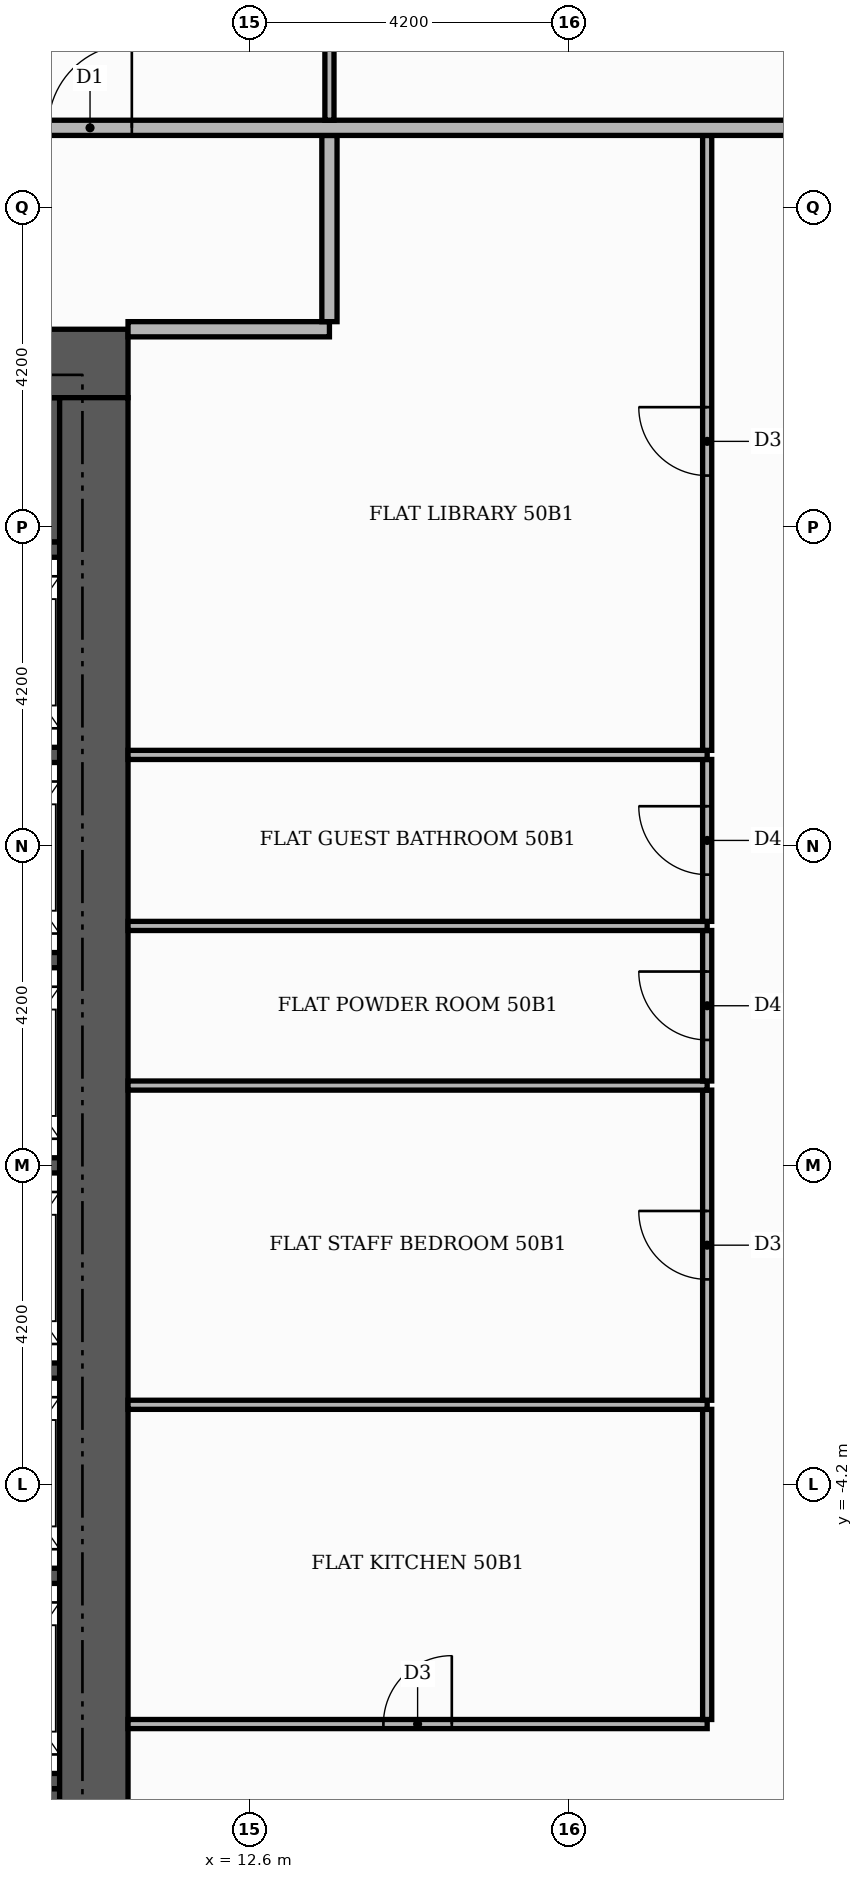
"""IFC4 building model, lengths in metres.
Left out: names, types, materials, properties, quantities, classifications, styles, units other than length and angle.
Written with IfcOpenShell. Run it as: python <this file> out.ifc"""

import sys

from ifc_helpers import new_model, si_unit, direction, frame, frame_2d, origin, place, context, subcontext, project, spatial, rectangle, extrude, element, fill, save


model = new_model("IFC4")
c1 = context("Model", 3, precision=1e-05, world=origin(), true_north=direction((0.0, 1.0)))
c2 = subcontext(c1, "Body", "Model", "MODEL_VIEW")
j1 = project(units=[si_unit("LENGTHUNIT", "METRE"), si_unit("PLANEANGLEUNIT", "RADIAN")], contexts=[c1])
p1 = place(None, origin())
s1 = spatial("IfcSite", under=j1, at=p1, CompositionType="ELEMENT")
p2 = place(p1, origin())
s2 = spatial("IfcBuilding", under=s1, at=p2, CompositionType="ELEMENT")
p3 = place(p2, frame((0.0, 0.0, 211.8)))
s3 = spatial("IfcBuildingStorey", under=s2, at=p3, CompositionType="ELEMENT", Elevation=211.8)
for number, where, z_axis, x_axis in (
    (1, (5.5, -9.15, 0.0), (0.0, 0.0, 1.0), (1.0, 0.0, 0.0)),
    (2, (5.5, 9.15, 0.0), (0.0, 0.0, 1.0), (1.0, 0.0, 0.0)),
):
    element("IfcWall", number, at=place(p3, frame(where, z_axis=z_axis, x_axis=x_axis)), inside=s3, PredefinedType="SHEAR", context=c2, shape_type="SweptSolid", body=[
        extrude(rectangle(XDim=4.6, YDim=1.9, at=frame_2d((2.3, 0.0))), origin(), (0.0, 0.0, 1.0), 3.48),
    ])
for number, where, z_axis, x_axis in (
    (3, (8.1, -8.1, 0.0), (0.0, 0.0, 1.0), (1.0, 0.0, 0.0)),
    (4, (8.1, -5.4, 0.0), (0.0, 0.0, 1.0), (1.0, 0.0, 0.0)),
    (5, (8.1, -2.7, 0.0), (0.0, 0.0, 1.0), (1.0, 0.0, 0.0)),
    (6, (8.1, 0.0, 0.0), (0.0, 0.0, 1.0), (1.0, 0.0, 0.0)),
    (7, (8.1, 2.7, 0.0), (0.0, 0.0, 1.0), (1.0, 0.0, 0.0)),
    (8, (8.1, 5.4, 0.0), (0.0, 0.0, 1.0), (1.0, 0.0, 0.0)),
    (9, (8.1, 8.1, 0.0), (0.0, 0.0, 1.0), (1.0, 0.0, 0.0)),
):
    element("IfcWall", number, at=place(p3, frame(where, z_axis=z_axis, x_axis=x_axis)), inside=s3, PredefinedType="SHEAR", context=c2, shape_type="SweptSolid", body=[
        extrude(rectangle(XDim=2.0, YDim=0.2, at=frame_2d((1.0, 0.0))), origin(), (0.0, 0.0, 1.0), 3.48),
    ])
p4 = place(p3, frame((-11.0, 10.55, 0.0), z_axis=(0.0, 0.0, 1.0), x_axis=(1.0, 0.0, 0.0)))
e10 = element("IfcWall", 10, at=p4, inside=s3, PredefinedType="SHEAR", context=c2, shape_type="SweptSolid", body=[
    extrude(rectangle(XDim=22.0, YDim=0.9, at=frame_2d((11.0, 0.0))), origin(), (0.0, 0.0, 1.0), 3.48),
])
p5 = place(p4, frame((13.3, 0.0, 0.0)))
e11 = element("IfcOpeningElement", 11, at=p5, cuts=e10, PredefinedType="OPENING", context=c2, shape_type="SweptSolid", body=[
    extrude(rectangle(XDim=1.8, YDim=2.2, at=frame_2d((0.9, 1.1))), frame((0.0, 0.46, 0.0), z_axis=(0.0, -1.0, 0.0), x_axis=(1.0, 0.0, 0.0)), (0.0, 0.0, 1.0), 0.92),
])
p6 = place(p3, frame((10.55, -10.1, 0.0), z_axis=(0.0, 0.0, 1.0), x_axis=(0.0, 1.0, 0.0)))
e12 = element("IfcWall", 12, at=p6, inside=s3, PredefinedType="SHEAR", context=c2, shape_type="SweptSolid", body=[
    extrude(rectangle(XDim=20.2, YDim=0.9, at=frame_2d((10.1, 0.0))), origin(), (0.0, 0.0, 1.0), 3.48),
])
p7 = place(p3, frame((11.0, -7.35, 0.0), z_axis=(0.0, 0.0, 1.0), x_axis=(1.0, 0.0, 0.0)))
e13 = element("IfcWall", 13, at=p7, inside=s3, PredefinedType="PARTITIONING", context=c2, shape_type="SweptSolid", body=[
    extrude(rectangle(XDim=7.62, YDim=0.12, at=frame_2d((3.81, 0.0))), origin(), (0.0, 0.0, 1.0), 3.48),
])
p8 = place(p7, frame((3.36, 0.0, 0.0)))
e14 = element("IfcOpeningElement", 14, at=p8, cuts=e13, PredefinedType="OPENING", context=c2, shape_type="SweptSolid", body=[
    extrude(rectangle(XDim=0.9, YDim=2.1, at=frame_2d((0.45, 1.05))), frame((0.0, 0.07, 0.0), z_axis=(0.0, -1.0, 0.0), x_axis=(1.0, 0.0, 0.0)), (0.0, 0.0, 1.0), 0.14),
])
p9 = place(p3, frame((18.62, -7.29, 0.0), z_axis=(0.0, 0.0, 1.0), x_axis=(0.0, 1.0, 0.0)))
e15 = element("IfcWall", 15, at=p9, inside=s3, PredefinedType="PARTITIONING", context=c2, shape_type="SweptSolid", body=[
    extrude(rectangle(XDim=4.08, YDim=0.12, at=frame_2d((2.04, 0.0))), origin(), (0.0, 0.0, 1.0), 3.48),
])
p10 = place(p3, frame((11.0, -3.15, 0.0), z_axis=(0.0, 0.0, 1.0), x_axis=(1.0, 0.0, 0.0)))
e16 = element("IfcWall", 16, at=p10, inside=s3, PredefinedType="PARTITIONING", context=c2, shape_type="SweptSolid", body=[
    extrude(rectangle(XDim=7.62, YDim=0.12, at=frame_2d((3.81, 0.0))), origin(), (0.0, 0.0, 1.0), 3.48),
])
p11 = place(p3, frame((18.62, -3.09, 0.0), z_axis=(0.0, 0.0, 1.0), x_axis=(0.0, 1.0, 0.0)))
e17 = element("IfcWall", 17, at=p11, inside=s3, PredefinedType="PARTITIONING", context=c2, shape_type="SweptSolid", body=[
    extrude(rectangle(XDim=4.08, YDim=0.12, at=frame_2d((2.04, 0.0))), origin(), (0.0, 0.0, 1.0), 3.48),
])
p12 = place(p11, frame((1.59, 0.0, 0.0)))
e18 = element("IfcOpeningElement", 18, at=p12, cuts=e17, PredefinedType="OPENING", context=c2, shape_type="SweptSolid", body=[
    extrude(rectangle(XDim=0.9, YDim=2.1, at=frame_2d((0.45, 1.05))), frame((0.0, 0.07, 0.0), z_axis=(0.0, -1.0, 0.0), x_axis=(1.0, 0.0, 0.0)), (0.0, 0.0, 1.0), 0.14),
])
p13 = place(p3, frame((11.0, 1.05, 0.0), z_axis=(0.0, 0.0, 1.0), x_axis=(1.0, 0.0, 0.0)))
e19 = element("IfcWall", 19, at=p13, inside=s3, PredefinedType="PARTITIONING", context=c2, shape_type="SweptSolid", body=[
    extrude(rectangle(XDim=7.62, YDim=0.12, at=frame_2d((3.81, 0.0))), origin(), (0.0, 0.0, 1.0), 3.48),
])
p14 = place(p3, frame((18.62, 1.11, 0.0), z_axis=(0.0, 0.0, 1.0), x_axis=(0.0, 1.0, 0.0)))
e20 = element("IfcWall", 20, at=p14, inside=s3, PredefinedType="PARTITIONING", context=c2, shape_type="SweptSolid", body=[
    extrude(rectangle(XDim=1.98, YDim=0.12, at=frame_2d((0.99, 0.0))), origin(), (0.0, 0.0, 1.0), 3.48),
])
p15 = place(p14, frame((0.54, 0.0, 0.0)))
e21 = element("IfcOpeningElement", 21, at=p15, cuts=e20, PredefinedType="OPENING", context=c2, shape_type="SweptSolid", body=[
    extrude(rectangle(XDim=0.9, YDim=2.1, at=frame_2d((0.45, 1.05))), frame((0.0, 0.07, 0.0), z_axis=(0.0, -1.0, 0.0), x_axis=(1.0, 0.0, 0.0)), (0.0, 0.0, 1.0), 0.14),
])
p16 = place(p3, frame((11.0, 3.15, 0.0), z_axis=(0.0, 0.0, 1.0), x_axis=(1.0, 0.0, 0.0)))
e22 = element("IfcWall", 22, at=p16, inside=s3, PredefinedType="PARTITIONING", context=c2, shape_type="SweptSolid", body=[
    extrude(rectangle(XDim=7.62, YDim=0.12, at=frame_2d((3.81, 0.0))), origin(), (0.0, 0.0, 1.0), 3.48),
])
p17 = place(p3, frame((18.62, 3.21, 0.0), z_axis=(0.0, 0.0, 1.0), x_axis=(0.0, 1.0, 0.0)))
e23 = element("IfcWall", 23, at=p17, inside=s3, PredefinedType="PARTITIONING", context=c2, shape_type="SweptSolid", body=[
    extrude(rectangle(XDim=2.13, YDim=0.12, at=frame_2d((1.065, 0.0))), origin(), (0.0, 0.0, 1.0), 3.48),
])
p18 = place(p17, frame((0.615, 0.0, 0.0)))
e24 = element("IfcOpeningElement", 24, at=p18, cuts=e23, PredefinedType="OPENING", context=c2, shape_type="SweptSolid", body=[
    extrude(rectangle(XDim=0.9, YDim=2.1, at=frame_2d((0.45, 1.05))), frame((0.0, 0.07, 0.0), z_axis=(0.0, -1.0, 0.0), x_axis=(1.0, 0.0, 0.0)), (0.0, 0.0, 1.0), 0.14),
])
p19 = place(p3, frame((11.0, 5.4, 0.0), z_axis=(0.0, 0.0, 1.0), x_axis=(1.0, 0.0, 0.0)))
e25 = element("IfcWall", 25, at=p19, inside=s3, PredefinedType="PARTITIONING", context=c2, shape_type="SweptSolid", body=[
    extrude(rectangle(XDim=7.62, YDim=0.12, at=frame_2d((3.81, 0.0))), origin(), (0.0, 0.0, 1.0), 3.48),
])
p20 = place(p3, frame((18.62, 5.46, 0.0), z_axis=(0.0, 0.0, 1.0), x_axis=(0.0, 1.0, 0.0)))
e26 = element("IfcWall", 26, at=p20, inside=s3, PredefinedType="PARTITIONING", context=c2, shape_type="SweptSolid", body=[
    extrude(rectangle(XDim=8.09, YDim=0.12, at=frame_2d((4.045, 0.0))), origin(), (0.0, 0.0, 1.0), 3.48),
])
p21 = place(p20, frame((3.615, 0.0, 0.0)))
e27 = element("IfcOpeningElement", 27, at=p21, cuts=e26, PredefinedType="OPENING", context=c2, shape_type="SweptSolid", body=[
    extrude(rectangle(XDim=0.9, YDim=2.1, at=frame_2d((0.45, 1.05))), frame((0.0, 0.07, 0.0), z_axis=(0.0, -1.0, 0.0), x_axis=(1.0, 0.0, 0.0)), (0.0, 0.0, 1.0), 0.14),
])
p22 = place(p3, frame((11.0, 11.0, 0.0), z_axis=(0.0, 0.0, 1.0), x_axis=(1.0, 0.0, 0.0)))
e28 = element("IfcWall", 28, at=p22, inside=s3, PredefinedType="PARTITIONING", context=c2, shape_type="SweptSolid", body=[
    extrude(rectangle(XDim=2.65, YDim=0.2, at=frame_2d((1.325, 0.0))), origin(), (0.0, 0.0, 1.0), 3.48),
])
p23 = place(p3, frame((13.65, 11.1, 0.0), z_axis=(0.0, 0.0, 1.0), x_axis=(0.0, 1.0, 0.0)))
e29 = element("IfcWall", 29, at=p23, inside=s3, PredefinedType="PARTITIONING", context=c2, shape_type="SweptSolid", body=[
    extrude(rectangle(XDim=2.45, YDim=0.2, at=frame_2d((1.225, 0.0))), origin(), (0.0, 0.0, 1.0), 3.48),
])
p24 = place(p3, frame((-13.65, 13.65, 0.0), z_axis=(0.0, 0.0, 1.0), x_axis=(1.0, 0.0, 0.0)))
e30 = element("IfcWall", 30, at=p24, inside=s3, PredefinedType="PARTITIONING", context=c2, shape_type="SweptSolid", body=[
    extrude(rectangle(XDim=39.07, YDim=0.2, at=frame_2d((19.535, 0.0))), origin(), (0.0, 0.0, 1.0), 3.48),
])
p25 = place(p24, frame((23.6, 0.0, 0.0)))
e31 = element("IfcOpeningElement", 31, at=p25, cuts=e30, PredefinedType="OPENING", context=c2, shape_type="SweptSolid", body=[
    extrude(rectangle(XDim=1.1, YDim=2.4, at=frame_2d((0.55, 1.2))), frame((0.0, 0.11, 0.0), z_axis=(0.0, -1.0, 0.0), x_axis=(1.0, 0.0, 0.0)), (0.0, 0.0, 1.0), 0.22),
])
p26 = place(p3, frame((13.65, 13.75, 0.0), z_axis=(0.0, 0.0, 1.0), x_axis=(0.0, 1.0, 0.0)))
e32 = element("IfcWall", 32, at=p26, inside=s3, PredefinedType="PARTITIONING", context=c2, shape_type="SweptSolid", body=[
    extrude(rectangle(XDim=6.01, YDim=0.12, at=frame_2d((3.005, 0.0))), origin(), (0.0, 0.0, 1.0), 3.48),
])
p27 = place(p26, frame((2.535, 0.0, 0.0)))
e33 = element("IfcOpeningElement", 33, at=p27, cuts=e32, PredefinedType="OPENING", context=c2, shape_type="SweptSolid", body=[
    extrude(rectangle(XDim=0.9, YDim=2.1, at=frame_2d((0.45, 1.05))), frame((0.0, 0.07, 0.0), z_axis=(0.0, -1.0, 0.0), x_axis=(1.0, 0.0, 0.0)), (0.0, 0.0, 1.0), 0.14),
])
p28 = place(p8, origin())
e34 = element("IfcDoor", 34, at=p28, inside=s3, OperationType="SINGLE_SWING_RIGHT", PredefinedType="DOOR", context=c2, shape_type="SweptSolid", body=[
    extrude(rectangle(XDim=0.9, YDim=2.1, at=frame_2d((0.45, 1.05))), frame((0.0, 0.025, 0.0), z_axis=(0.0, -1.0, 0.0), x_axis=(1.0, 0.0, 0.0)), (0.0, 0.0, 1.0), 0.05),
])
fill(e14, e34)
p29 = place(p12, origin())
e35 = element("IfcDoor", 35, at=p29, inside=s3, OperationType="SINGLE_SWING_RIGHT", PredefinedType="DOOR", context=c2, shape_type="SweptSolid", body=[
    extrude(rectangle(XDim=0.9, YDim=2.1, at=frame_2d((0.45, 1.05))), frame((0.0, 0.025, 0.0), z_axis=(0.0, -1.0, 0.0), x_axis=(1.0, 0.0, 0.0)), (0.0, 0.0, 1.0), 0.05),
])
fill(e18, e35)
p30 = place(p15, origin())
e36 = element("IfcDoor", 36, at=p30, inside=s3, OperationType="SINGLE_SWING_RIGHT", PredefinedType="DOOR", context=c2, shape_type="SweptSolid", body=[
    extrude(rectangle(XDim=0.9, YDim=2.1, at=frame_2d((0.45, 1.05))), frame((0.0, 0.025, 0.0), z_axis=(0.0, -1.0, 0.0), x_axis=(1.0, 0.0, 0.0)), (0.0, 0.0, 1.0), 0.05),
])
fill(e21, e36)
p31 = place(p18, origin())
e37 = element("IfcDoor", 37, at=p31, inside=s3, OperationType="SINGLE_SWING_RIGHT", PredefinedType="DOOR", context=c2, shape_type="SweptSolid", body=[
    extrude(rectangle(XDim=0.9, YDim=2.1, at=frame_2d((0.45, 1.05))), frame((0.0, 0.025, 0.0), z_axis=(0.0, -1.0, 0.0), x_axis=(1.0, 0.0, 0.0)), (0.0, 0.0, 1.0), 0.05),
])
fill(e24, e37)
p32 = place(p21, origin())
e38 = element("IfcDoor", 38, at=p32, inside=s3, OperationType="SINGLE_SWING_RIGHT", PredefinedType="DOOR", context=c2, shape_type="SweptSolid", body=[
    extrude(rectangle(XDim=0.9, YDim=2.1, at=frame_2d((0.45, 1.05))), frame((0.0, 0.025, 0.0), z_axis=(0.0, -1.0, 0.0), x_axis=(1.0, 0.0, 0.0)), (0.0, 0.0, 1.0), 0.05),
])
fill(e27, e38)
p33 = place(p25, origin())
e39 = element("IfcDoor", 39, at=p33, inside=s3, OperationType="SINGLE_SWING_RIGHT", PredefinedType="DOOR", context=c2, shape_type="SweptSolid", body=[
    extrude(rectangle(XDim=1.1, YDim=2.4, at=frame_2d((0.55, 1.2))), frame((0.0, 0.025, 0.0), z_axis=(0.0, -1.0, 0.0), x_axis=(1.0, 0.0, 0.0)), (0.0, 0.0, 1.0), 0.05),
])
fill(e31, e39)
save(model, sys.argv[1])
